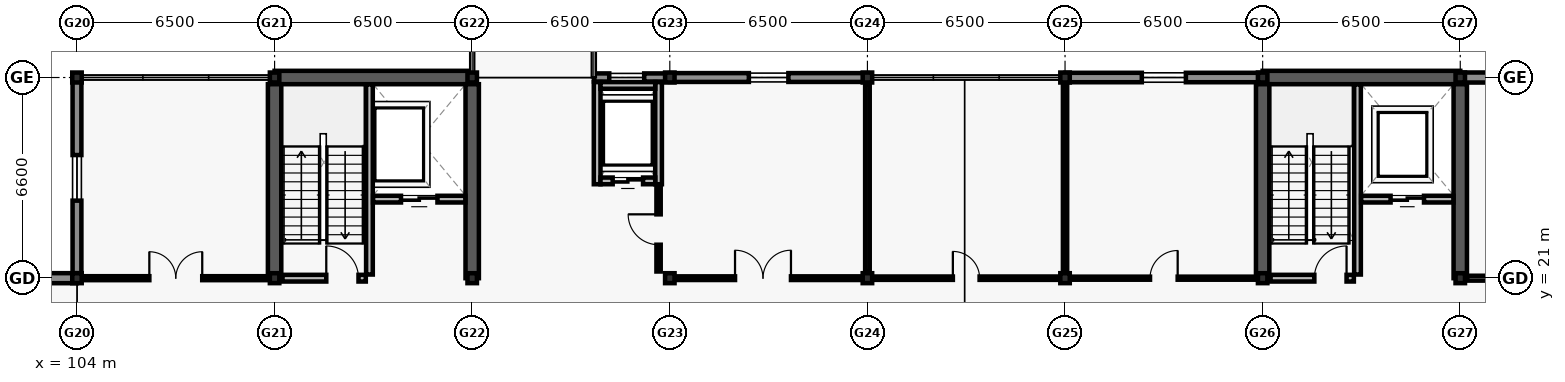
"""IFC4 building model, lengths in metres.
Left out: names, types, materials, properties, quantities, classifications, styles, units other than length and angle.
Written with IfcOpenShell. Run it as: python <this file> out.ifc"""

import sys

from ifc_helpers import new_model, si_unit, direction, frame, frame_2d, origin, origin_2d, place, context, subcontext, project, spatial, rectangle, i_section, extrude, element, fill, save


model = new_model("IFC4")
c1 = context("Model", 3, precision=1e-05, world=origin(), true_north=direction((0.0, 1.0)))
c2 = subcontext(c1, "Body", "Model", "MODEL_VIEW")
j1 = project(units=[si_unit("LENGTHUNIT", "METRE"), si_unit("PLANEANGLEUNIT", "RADIAN")], contexts=[c1])
p1 = place(None, origin())
s1 = spatial("IfcSite", under=j1, at=p1, CompositionType="ELEMENT")
p2 = place(p1, origin())
s2 = spatial("IfcBuilding", under=s1, at=p2, CompositionType="ELEMENT")
p3 = place(p2, frame((0.0, 0.0, 5.4)))
s3 = spatial("IfcBuildingStorey", under=s2, at=p3, CompositionType="ELEMENT", Elevation=5.4)
for number, where, z_axis, x_axis in (
    (1, (104.0, 21.0, 0.0), (0.0, 0.0, 1.0), (1.0, 0.0, 0.0)),
    (2, (104.0, 27.6, 0.0), (0.0, 0.0, 1.0), (1.0, 0.0, 0.0)),
    (3, (110.5, 21.0, 0.0), (0.0, 0.0, 1.0), (1.0, 0.0, 0.0)),
    (4, (110.5, 27.6, 0.0), (0.0, 0.0, 1.0), (1.0, 0.0, 0.0)),
    (5, (117.0, 21.0, 0.0), (0.0, 0.0, 1.0), (1.0, 0.0, 0.0)),
    (6, (117.0, 27.6, 0.0), (0.0, 0.0, 1.0), (1.0, 0.0, 0.0)),
    (7, (123.5, 21.0, 0.0), (0.0, 0.0, 1.0), (1.0, 0.0, 0.0)),
    (8, (123.5, 27.6, 0.0), (0.0, 0.0, 1.0), (1.0, 0.0, 0.0)),
    (9, (130.0, 21.0, 0.0), (0.0, 0.0, 1.0), (1.0, 0.0, 0.0)),
    (10, (130.0, 27.6, 0.0), (0.0, 0.0, 1.0), (1.0, 0.0, 0.0)),
    (11, (136.5, 21.0, 0.0), (0.0, 0.0, 1.0), (1.0, 0.0, 0.0)),
    (12, (136.5, 27.6, 0.0), (0.0, 0.0, 1.0), (1.0, 0.0, 0.0)),
    (13, (143.0, 21.0, 0.0), (0.0, 0.0, 1.0), (1.0, 0.0, 0.0)),
    (14, (143.0, 27.6, 0.0), (0.0, 0.0, 1.0), (1.0, 0.0, 0.0)),
    (15, (149.5, 21.0, 0.0), (0.0, 0.0, 1.0), (1.0, 0.0, 0.0)),
    (16, (149.5, 27.6, 0.0), (0.0, 0.0, 1.0), (1.0, 0.0, 0.0)),
):
    element("IfcColumn", number, at=place(p3, frame(where, z_axis=z_axis, x_axis=x_axis)), inside=s3, PredefinedType="COLUMN", context=c2, shape_type="SweptSolid", body=[
        extrude(i_section(OverallWidth=0.311, OverallDepth=0.327, WebThickness=0.016, FlangeThickness=0.025, FilletRadius=0.017, at=origin_2d()), origin(), (0.0, 0.0, 1.0), 4.2),
    ])
p4 = place(p3, frame((110.5, 27.6, 0.0), z_axis=(0.0, 0.0, 1.0), x_axis=(1.0, 0.0, 0.0)))
e17 = element("IfcWall", 17, at=p4, inside=s3, PredefinedType="SHEAR", context=c2, shape_type="SweptSolid", body=[
    extrude(rectangle(XDim=6.5, YDim=0.44, at=frame_2d((3.25, 0.0))), origin(), (0.0, 0.0, 1.0), 3.96),
])
for number, where, z_axis, x_axis in (
    (18, (110.5, 21.0, 0.0), (0.0, 0.0, 1.0), (0.0, 1.0, 0.0)),
    (19, (117.0, 21.0, 0.0), (0.0, 0.0, 1.0), (0.0, 1.0, 0.0)),
):
    element("IfcWall", number, at=place(p3, frame(where, z_axis=z_axis, x_axis=x_axis)), inside=s3, PredefinedType="SHEAR", context=c2, shape_type="SweptSolid", body=[
        extrude(rectangle(XDim=6.38, YDim=0.44, at=frame_2d((3.19, 0.0))), origin(), (0.0, 0.0, 1.0), 3.96),
    ])
p5 = place(p3, frame((143.0, 27.6, 0.0), z_axis=(0.0, 0.0, 1.0), x_axis=(1.0, 0.0, 0.0)))
e20 = element("IfcWall", 20, at=p5, inside=s3, PredefinedType="SHEAR", context=c2, shape_type="SweptSolid", body=[
    extrude(rectangle(XDim=6.5, YDim=0.44, at=frame_2d((3.25, 0.0))), origin(), (0.0, 0.0, 1.0), 3.96),
])
for number, where, z_axis, x_axis in (
    (21, (143.0, 21.0, 0.0), (0.0, 0.0, 1.0), (0.0, 1.0, 0.0)),
    (22, (149.5, 21.0, 0.0), (0.0, 0.0, 1.0), (0.0, 1.0, 0.0)),
):
    element("IfcWall", number, at=place(p3, frame(where, z_axis=z_axis, x_axis=x_axis)), inside=s3, PredefinedType="SHEAR", context=c2, shape_type="SweptSolid", body=[
        extrude(rectangle(XDim=6.38, YDim=0.44, at=frame_2d((3.19, 0.0))), origin(), (0.0, 0.0, 1.0), 3.96),
    ])
p6 = place(p3, frame((121.005, 27.6, 0.0), z_axis=(0.0, 0.0, 1.0), x_axis=(1.0, 0.0, 0.0)))
e23 = element("IfcWall", 23, at=p6, inside=s3, PredefinedType="SOLIDWALL", context=c2, shape_type="SweptSolid", body=[
    extrude(rectangle(XDim=2.49, YDim=0.27, at=frame_2d((1.245, 0.0))), origin(), (0.0, 0.0, 1.0), 3.32),
])
p7 = place(p6, frame((0.502, 0.0, 0.8)))
e24 = element("IfcOpeningElement", 24, at=p7, cuts=e23, PredefinedType="OPENING", context=c2, shape_type="SweptSolid", body=[
    extrude(rectangle(XDim=1.15, YDim=1.8, at=frame_2d((0.575, 0.9))), frame((0.0, 0.145, 0.0), z_axis=(0.0, -1.0, 0.0), x_axis=(1.0, 0.0, 0.0)), (0.0, 0.0, 1.0), 0.29),
])
p8 = place(p3, frame((123.505, 27.6, 0.0), z_axis=(0.0, 0.0, 1.0), x_axis=(1.0, 0.0, 0.0)))
e25 = element("IfcWall", 25, at=p8, inside=s3, PredefinedType="SOLIDWALL", context=c2, shape_type="SweptSolid", body=[
    extrude(rectangle(XDim=6.49, YDim=0.29, at=frame_2d((3.245, 0.0))), origin(), (0.0, 0.0, 1.0), 3.32),
])
p9 = place(p8, frame((2.595, 0.0, 0.8)))
e26 = element("IfcOpeningElement", 26, at=p9, cuts=e25, PredefinedType="OPENING", context=c2, shape_type="SweptSolid", body=[
    extrude(rectangle(XDim=1.3, YDim=1.8, at=frame_2d((0.65, 0.9))), frame((0.0, 0.155, 0.0), z_axis=(0.0, -1.0, 0.0), x_axis=(1.0, 0.0, 0.0)), (0.0, 0.0, 1.0), 0.31),
])
p10 = place(p3, frame((136.505, 27.6, 0.0), z_axis=(0.0, 0.0, 1.0), x_axis=(1.0, 0.0, 0.0)))
e27 = element("IfcWall", 27, at=p10, inside=s3, PredefinedType="SOLIDWALL", context=c2, shape_type="SweptSolid", body=[
    extrude(rectangle(XDim=6.49, YDim=0.31, at=frame_2d((3.245, 0.0))), origin(), (0.0, 0.0, 1.0), 3.32),
])
p11 = place(p10, frame((2.52, 0.0, 0.8)))
e28 = element("IfcOpeningElement", 28, at=p11, cuts=e27, PredefinedType="OPENING", context=c2, shape_type="SweptSolid", body=[
    extrude(rectangle(XDim=1.45, YDim=1.8, at=frame_2d((0.725, 0.9))), frame((0.0, 0.165, 0.0), z_axis=(0.0, -1.0, 0.0), x_axis=(1.0, 0.0, 0.0)), (0.0, 0.0, 1.0), 0.33),
])
p12 = place(p3, frame((149.505, 27.6, 0.0), z_axis=(0.0, 0.0, 1.0), x_axis=(1.0, 0.0, 0.0)))
e29 = element("IfcWall", 29, at=p12, inside=s3, PredefinedType="SOLIDWALL", context=c2, shape_type="SweptSolid", body=[
    extrude(rectangle(XDim=6.49, YDim=0.33, at=frame_2d((3.245, 0.0))), origin(), (0.0, 0.0, 1.0), 3.32),
])
p13 = place(p12, frame((2.445, 0.0, 0.8)))
e30 = element("IfcOpeningElement", 30, at=p13, cuts=e29, PredefinedType="OPENING", context=c2, shape_type="SweptSolid", body=[
    extrude(rectangle(XDim=1.6, YDim=1.8, at=frame_2d((0.8, 0.9))), frame((0.0, 0.175, 0.0), z_axis=(0.0, -1.0, 0.0), x_axis=(1.0, 0.0, 0.0)), (0.0, 0.0, 1.0), 0.35),
])
p14 = place(p3, frame((104.0, 21.005, 0.0), z_axis=(0.0, 0.0, 1.0), x_axis=(0.0, 1.0, 0.0)))
e31 = element("IfcWall", 31, at=p14, inside=s3, PredefinedType="SOLIDWALL", context=c2, shape_type="SweptSolid", body=[
    extrude(rectangle(XDim=6.59, YDim=0.29, at=frame_2d((3.295, 0.0))), origin(), (0.0, 0.0, 1.0), 3.32),
])
p15 = place(p14, frame((2.545, 0.0, 0.8)))
e32 = element("IfcOpeningElement", 32, at=p15, cuts=e31, PredefinedType="OPENING", context=c2, shape_type="SweptSolid", body=[
    extrude(rectangle(XDim=1.5, YDim=2.05, at=frame_2d((0.75, 1.025))), frame((0.0, 0.155, 0.0), z_axis=(0.0, -1.0, 0.0), x_axis=(1.0, 0.0, 0.0)), (0.0, 0.0, 1.0), 0.31),
])
p16 = place(p3, frame((102.805, 21.0, 0.0), z_axis=(0.0, 0.0, 1.0), x_axis=(1.0, 0.0, 0.0)))
e33 = element("IfcWall", 33, at=p16, inside=s3, PredefinedType="SOLIDWALL", context=c2, shape_type="SweptSolid", body=[
    extrude(rectangle(XDim=1.19, YDim=0.33, at=frame_2d((0.595, 0.0))), origin(), (0.0, 0.0, 1.0), 3.32),
])
p17 = place(p3, frame((113.62, 21.12, 0.0), z_axis=(0.0, 0.0, 1.0), x_axis=(0.0, 1.0, 0.0)))
e34 = element("IfcWall", 34, at=p17, inside=s3, PredefinedType="SOLIDWALL", context=c2, shape_type="SweptSolid", body=[
    extrude(rectangle(XDim=6.255, YDim=0.22, at=frame_2d((3.127, 0.0))), origin(), (0.0, 0.0, 1.0), 3.96),
])
p18 = place(p3, frame((110.76, 21.0, 0.0), z_axis=(0.0, 0.0, 1.0), x_axis=(1.0, 0.0, 0.0)))
e35 = element("IfcWall", 35, at=p18, inside=s3, PredefinedType="SOLIDWALL", context=c2, shape_type="SweptSolid", body=[
    extrude(rectangle(XDim=2.74, YDim=0.22, at=frame_2d((1.37, 0.0))), origin(), (0.0, 0.0, 1.0), 3.32),
])
p19 = place(p18, frame((1.44, 0.0, 0.0)))
e36 = element("IfcOpeningElement", 36, at=p19, cuts=e35, PredefinedType="OPENING", context=c2, shape_type="SweptSolid", body=[
    extrude(rectangle(XDim=1.06, YDim=2.1, at=frame_2d((0.53, 1.05))), frame((0.0, 0.12, 0.0), z_axis=(0.0, -1.0, 0.0), x_axis=(1.0, 0.0, 0.0)), (0.0, 0.0, 1.0), 0.24),
])
p20 = place(p3, frame((113.74, 23.6, 0.0), z_axis=(0.0, 0.0, 1.0), x_axis=(1.0, 0.0, 0.0)))
e37 = element("IfcWall", 37, at=p20, inside=s3, PredefinedType="SOLIDWALL", context=c2, shape_type="SweptSolid", body=[
    extrude(rectangle(XDim=3.035, YDim=0.22, at=frame_2d((1.518, 0.0))), origin(), (0.0, 0.0, 1.0), 3.96),
])
p21 = place(p20, frame((0.917, 0.0, 0.0)))
e38 = element("IfcOpeningElement", 38, at=p21, cuts=e37, PredefinedType="OPENING", context=c2, shape_type="SweptSolid", body=[
    extrude(rectangle(XDim=1.2, YDim=2.15, at=frame_2d((0.6, 1.075))), frame((0.0, 0.12, 0.0), z_axis=(0.0, -1.0, 0.0), x_axis=(1.0, 0.0, 0.0)), (0.0, 0.0, 1.0), 0.24),
])
for number, where, z_axis, x_axis in (
    (39, (121.11, 24.09, 0.0), (0.0, 0.0, 1.0), (0.0, 1.0, 0.0)),
    (40, (123.13, 24.09, 0.0), (0.0, 0.0, 1.0), (0.0, 1.0, 0.0)),
):
    element("IfcWall", number, at=place(p3, frame(where, z_axis=z_axis, x_axis=x_axis)), inside=s3, PredefinedType="SOLIDWALL", context=c2, shape_type="SweptSolid", body=[
        extrude(rectangle(XDim=3.36, YDim=0.22, at=frame_2d((1.68, 0.0))), origin(), (0.0, 0.0, 1.0), 3.96),
    ])
p22 = place(p3, frame((121.22, 27.34, 0.0), z_axis=(0.0, 0.0, 1.0), x_axis=(1.0, 0.0, 0.0)))
e41 = element("IfcWall", 41, at=p22, inside=s3, PredefinedType="SOLIDWALL", context=c2, shape_type="SweptSolid", body=[
    extrude(rectangle(XDim=1.8, YDim=0.22, at=frame_2d((0.9, 0.0))), origin(), (0.0, 0.0, 1.0), 3.96),
])
p23 = place(p3, frame((121.22, 24.2, 0.0), z_axis=(0.0, 0.0, 1.0), x_axis=(1.0, 0.0, 0.0)))
e42 = element("IfcWall", 42, at=p23, inside=s3, PredefinedType="SOLIDWALL", context=c2, shape_type="SweptSolid", body=[
    extrude(rectangle(XDim=1.8, YDim=0.22, at=frame_2d((0.9, 0.0))), origin(), (0.0, 0.0, 1.0), 3.96),
])
p24 = place(p23, frame((0.4, 0.0, 0.0)))
e43 = element("IfcOpeningElement", 43, at=p24, cuts=e42, PredefinedType="OPENING", context=c2, shape_type="SweptSolid", body=[
    extrude(rectangle(XDim=1.0, YDim=2.1, at=frame_2d((0.5, 1.05))), frame((0.0, 0.12, 0.0), z_axis=(0.0, -1.0, 0.0), x_axis=(1.0, 0.0, 0.0)), (0.0, 0.0, 1.0), 0.24),
])
p25 = place(p3, frame((146.12, 21.12, 0.0), z_axis=(0.0, 0.0, 1.0), x_axis=(0.0, 1.0, 0.0)))
e44 = element("IfcWall", 44, at=p25, inside=s3, PredefinedType="SOLIDWALL", context=c2, shape_type="SweptSolid", body=[
    extrude(rectangle(XDim=6.255, YDim=0.22, at=frame_2d((3.127, 0.0))), origin(), (0.0, 0.0, 1.0), 3.96),
])
p26 = place(p3, frame((143.26, 21.0, 0.0), z_axis=(0.0, 0.0, 1.0), x_axis=(1.0, 0.0, 0.0)))
e45 = element("IfcWall", 45, at=p26, inside=s3, PredefinedType="SOLIDWALL", context=c2, shape_type="SweptSolid", body=[
    extrude(rectangle(XDim=2.74, YDim=0.22, at=frame_2d((1.37, 0.0))), origin(), (0.0, 0.0, 1.0), 3.32),
])
p27 = place(p26, frame((1.44, 0.0, 0.0)))
e46 = element("IfcOpeningElement", 46, at=p27, cuts=e45, PredefinedType="OPENING", context=c2, shape_type="SweptSolid", body=[
    extrude(rectangle(XDim=1.06, YDim=2.1, at=frame_2d((0.53, 1.05))), frame((0.0, 0.12, 0.0), z_axis=(0.0, -1.0, 0.0), x_axis=(1.0, 0.0, 0.0)), (0.0, 0.0, 1.0), 0.24),
])
p28 = place(p3, frame((146.24, 23.6, 0.0), z_axis=(0.0, 0.0, 1.0), x_axis=(1.0, 0.0, 0.0)))
e47 = element("IfcWall", 47, at=p28, inside=s3, PredefinedType="SOLIDWALL", context=c2, shape_type="SweptSolid", body=[
    extrude(rectangle(XDim=3.035, YDim=0.22, at=frame_2d((1.518, 0.0))), origin(), (0.0, 0.0, 1.0), 3.96),
])
p29 = place(p28, frame((0.968, 0.0, 0.0)))
e48 = element("IfcOpeningElement", 48, at=p29, cuts=e47, PredefinedType="OPENING", context=c2, shape_type="SweptSolid", body=[
    extrude(rectangle(XDim=1.1, YDim=2.1, at=frame_2d((0.55, 1.05))), frame((0.0, 0.12, 0.0), z_axis=(0.0, -1.0, 0.0), x_axis=(1.0, 0.0, 0.0)), (0.0, 0.0, 1.0), 0.24),
])
p30 = place(p3, frame((123.13, 21.22, 0.0), z_axis=(0.0, 0.0, 1.0), x_axis=(0.0, 1.0, 0.0)))
e49 = element("IfcWall", 49, at=p30, inside=s3, PredefinedType="PARTITIONING", context=c2, shape_type="SweptSolid", body=[
    extrude(rectangle(XDim=2.76, YDim=0.14, at=frame_2d((1.38, 0.0))), origin(), (0.0, 0.0, 1.0), 3.3),
])
p31 = place(p30, frame((0.88, 0.0, 0.0)))
e50 = element("IfcOpeningElement", 50, at=p31, cuts=e49, PredefinedType="OPENING", context=c2, shape_type="SweptSolid", body=[
    extrude(rectangle(XDim=1.0, YDim=2.12, at=frame_2d((0.5, 1.06))), frame((0.0, 0.08, 0.0), z_axis=(0.0, -1.0, 0.0), x_axis=(1.0, 0.0, 0.0)), (0.0, 0.0, 1.0), 0.16),
])
p32 = place(p3, frame((104.22, 21.0, 0.0), z_axis=(0.0, 0.0, 1.0), x_axis=(1.0, 0.0, 0.0)))
e51 = element("IfcWall", 51, at=p32, inside=s3, PredefinedType="PARTITIONING", context=c2, shape_type="SweptSolid", body=[
    extrude(rectangle(XDim=6.06, YDim=0.13, at=frame_2d((3.03, 0.0))), origin(), (0.0, 0.0, 1.0), 3.3),
])
p33 = place(p32, frame((2.16, 0.0, 0.0)))
e52 = element("IfcOpeningElement", 52, at=p33, cuts=e51, PredefinedType="OPENING", context=c2, shape_type="SweptSolid", body=[
    extrude(rectangle(XDim=1.74, YDim=2.2, at=frame_2d((0.87, 1.1))), frame((0.0, 0.075, 0.0), z_axis=(0.0, -1.0, 0.0), x_axis=(1.0, 0.0, 0.0)), (0.0, 0.0, 1.0), 0.15),
])
p34 = place(p3, frame((123.35, 21.0, 0.0), z_axis=(0.0, 0.0, 1.0), x_axis=(1.0, 0.0, 0.0)))
e53 = element("IfcWall", 53, at=p34, inside=s3, PredefinedType="PARTITIONING", context=c2, shape_type="SweptSolid", body=[
    extrude(rectangle(XDim=6.43, YDim=0.12, at=frame_2d((3.215, 0.0))), origin(), (0.0, 0.0, 1.0), 3.3),
])
p35 = place(p34, frame((2.295, 0.0, 0.0)))
e54 = element("IfcOpeningElement", 54, at=p35, cuts=e53, PredefinedType="OPENING", context=c2, shape_type="SweptSolid", body=[
    extrude(rectangle(XDim=1.84, YDim=2.22, at=frame_2d((0.92, 1.11))), frame((0.0, 0.07, 0.0), z_axis=(0.0, -1.0, 0.0), x_axis=(1.0, 0.0, 0.0)), (0.0, 0.0, 1.0), 0.14),
])
p36 = place(p3, frame((130.22, 21.0, 0.0), z_axis=(0.0, 0.0, 1.0), x_axis=(1.0, 0.0, 0.0)))
e55 = element("IfcWall", 55, at=p36, inside=s3, PredefinedType="PARTITIONING", context=c2, shape_type="SweptSolid", body=[
    extrude(rectangle(XDim=6.06, YDim=0.11, at=frame_2d((3.03, 0.0))), origin(), (0.0, 0.0, 1.0), 3.3),
])
p37 = place(p36, frame((2.59, 0.0, 0.0)))
e56 = element("IfcOpeningElement", 56, at=p37, cuts=e55, PredefinedType="OPENING", context=c2, shape_type="SweptSolid", body=[
    extrude(rectangle(XDim=0.88, YDim=2.04, at=frame_2d((0.44, 1.02))), frame((0.0, 0.065, 0.0), z_axis=(0.0, -1.0, 0.0), x_axis=(1.0, 0.0, 0.0)), (0.0, 0.0, 1.0), 0.13),
])
p38 = place(p3, frame((136.72, 21.0, 0.0), z_axis=(0.0, 0.0, 1.0), x_axis=(1.0, 0.0, 0.0)))
e57 = element("IfcWall", 57, at=p38, inside=s3, PredefinedType="PARTITIONING", context=c2, shape_type="SweptSolid", body=[
    extrude(rectangle(XDim=6.06, YDim=0.1, at=frame_2d((3.03, 0.0))), origin(), (0.0, 0.0, 1.0), 3.3),
])
p39 = place(p38, frame((2.575, 0.0, 0.0)))
e58 = element("IfcOpeningElement", 58, at=p39, cuts=e57, PredefinedType="OPENING", context=c2, shape_type="SweptSolid", body=[
    extrude(rectangle(XDim=0.91, YDim=2.06, at=frame_2d((0.455, 1.03))), frame((0.0, 0.06, 0.0), z_axis=(0.0, -1.0, 0.0), x_axis=(1.0, 0.0, 0.0)), (0.0, 0.0, 1.0), 0.12),
])
p40 = place(p3, frame((149.72, 21.0, 0.0), z_axis=(0.0, 0.0, 1.0), x_axis=(1.0, 0.0, 0.0)))
e59 = element("IfcWall", 59, at=p40, inside=s3, PredefinedType="PARTITIONING", context=c2, shape_type="SweptSolid", body=[
    extrude(rectangle(XDim=12.46, YDim=0.16, at=frame_2d((6.23, 0.0))), origin(), (0.0, 0.0, 1.0), 3.3),
])
p41 = place(p40, frame((5.01, 0.0, 0.0)))
e60 = element("IfcOpeningElement", 60, at=p41, cuts=e59, PredefinedType="OPENING", context=c2, shape_type="SweptSolid", body=[
    extrude(rectangle(XDim=0.94, YDim=2.08, at=frame_2d((0.47, 1.04))), frame((0.0, 0.09, 0.0), z_axis=(0.0, -1.0, 0.0), x_axis=(1.0, 0.0, 0.0)), (0.0, 0.0, 1.0), 0.18),
])
p42 = place(p3, frame((130.0, 21.22, 0.0), z_axis=(0.0, 0.0, 1.0), x_axis=(0.0, 1.0, 0.0)))
e61 = element("IfcWall", 61, at=p42, inside=s3, PredefinedType="PARTITIONING", context=c2, shape_type="SweptSolid", body=[
    extrude(rectangle(XDim=6.16, YDim=0.15, at=frame_2d((3.08, 0.0))), origin(), (0.0, 0.0, 1.0), 3.3),
])
p43 = place(p3, frame((136.5, 21.22, 0.0), z_axis=(0.0, 0.0, 1.0), x_axis=(0.0, 1.0, 0.0)))
e62 = element("IfcWall", 62, at=p43, inside=s3, PredefinedType="PARTITIONING", context=c2, shape_type="SweptSolid", body=[
    extrude(rectangle(XDim=6.16, YDim=0.14, at=frame_2d((3.08, 0.0))), origin(), (0.0, 0.0, 1.0), 3.3),
])
p44 = place(p7, origin())
e63 = element("IfcWindow", 63, at=p44, inside=s3, PartitioningType="SINGLE_PANEL", PredefinedType="WINDOW", context=c2, shape_type="SweptSolid", body=[
    extrude(rectangle(XDim=1.15, YDim=1.8, at=frame_2d((0.575, 0.9))), frame((0.0, 0.03, 0.0), z_axis=(0.0, -1.0, 0.0), x_axis=(1.0, 0.0, 0.0)), (0.0, 0.0, 1.0), 0.06),
])
fill(e24, e63)
p45 = place(p9, origin())
e64 = element("IfcWindow", 64, at=p45, inside=s3, PartitioningType="SINGLE_PANEL", PredefinedType="WINDOW", context=c2, shape_type="SweptSolid", body=[
    extrude(rectangle(XDim=1.3, YDim=1.8, at=frame_2d((0.65, 0.9))), frame((0.0, 0.03, 0.0), z_axis=(0.0, -1.0, 0.0), x_axis=(1.0, 0.0, 0.0)), (0.0, 0.0, 1.0), 0.06),
])
fill(e26, e64)
p46 = place(p11, origin())
e65 = element("IfcWindow", 65, at=p46, inside=s3, PartitioningType="SINGLE_PANEL", PredefinedType="WINDOW", context=c2, shape_type="SweptSolid", body=[
    extrude(rectangle(XDim=1.45, YDim=1.8, at=frame_2d((0.725, 0.9))), frame((0.0, 0.03, 0.0), z_axis=(0.0, -1.0, 0.0), x_axis=(1.0, 0.0, 0.0)), (0.0, 0.0, 1.0), 0.06),
])
fill(e28, e65)
p47 = place(p15, origin())
e66 = element("IfcWindow", 66, at=p47, inside=s3, PartitioningType="SINGLE_PANEL", PredefinedType="WINDOW", context=c2, shape_type="SweptSolid", body=[
    extrude(rectangle(XDim=1.5, YDim=2.05, at=frame_2d((0.75, 1.025))), frame((0.0, 0.03, 0.0), z_axis=(0.0, -1.0, 0.0), x_axis=(1.0, 0.0, 0.0)), (0.0, 0.0, 1.0), 0.06),
])
fill(e32, e66)
p48 = place(p19, origin())
e67 = element("IfcDoor", 67, at=p48, inside=s3, OperationType="SINGLE_SWING_LEFT", PredefinedType="DOOR", context=c2, shape_type="SweptSolid", body=[
    extrude(rectangle(XDim=1.06, YDim=2.1, at=frame_2d((0.53, 1.05))), frame((0.0, 0.025, 0.0), z_axis=(0.0, -1.0, 0.0), x_axis=(1.0, 0.0, 0.0)), (0.0, 0.0, 1.0), 0.05),
])
fill(e36, e67)
p49 = place(p21, origin())
e68 = element("IfcDoor", 68, at=p49, inside=s3, OperationType="DOUBLE_DOOR_SLIDING", PredefinedType="DOOR", context=c2, shape_type="SweptSolid", body=[
    extrude(rectangle(XDim=1.2, YDim=2.15, at=frame_2d((0.6, 1.075))), frame((0.0, 0.025, 0.0), z_axis=(0.0, -1.0, 0.0), x_axis=(1.0, 0.0, 0.0)), (0.0, 0.0, 1.0), 0.05),
])
fill(e38, e68)
p50 = place(p24, origin())
e69 = element("IfcDoor", 69, at=p50, inside=s3, OperationType="DOUBLE_DOOR_SLIDING", PredefinedType="DOOR", context=c2, shape_type="SweptSolid", body=[
    extrude(rectangle(XDim=1.0, YDim=2.1, at=frame_2d((0.5, 1.05))), frame((0.0, 0.025, 0.0), z_axis=(0.0, -1.0, 0.0), x_axis=(1.0, 0.0, 0.0)), (0.0, 0.0, 1.0), 0.05),
])
fill(e43, e69)
p51 = place(p27, origin())
e70 = element("IfcDoor", 70, at=p51, inside=s3, OperationType="SINGLE_SWING_RIGHT", PredefinedType="DOOR", context=c2, shape_type="SweptSolid", body=[
    extrude(rectangle(XDim=1.06, YDim=2.1, at=frame_2d((0.53, 1.05))), frame((0.0, 0.025, 0.0), z_axis=(0.0, -1.0, 0.0), x_axis=(1.0, 0.0, 0.0)), (0.0, 0.0, 1.0), 0.05),
])
fill(e46, e70)
p52 = place(p29, origin())
e71 = element("IfcDoor", 71, at=p52, inside=s3, OperationType="DOUBLE_DOOR_SLIDING", PredefinedType="DOOR", context=c2, shape_type="SweptSolid", body=[
    extrude(rectangle(XDim=1.1, YDim=2.1, at=frame_2d((0.55, 1.05))), frame((0.0, 0.025, 0.0), z_axis=(0.0, -1.0, 0.0), x_axis=(1.0, 0.0, 0.0)), (0.0, 0.0, 1.0), 0.05),
])
fill(e48, e71)
p53 = place(p31, origin())
e72 = element("IfcDoor", 72, at=p53, inside=s3, OperationType="SINGLE_SWING_RIGHT", PredefinedType="DOOR", context=c2, shape_type="SweptSolid", body=[
    extrude(rectangle(XDim=1.0, YDim=2.12, at=frame_2d((0.5, 1.06))), frame((0.0, 0.025, 0.0), z_axis=(0.0, -1.0, 0.0), x_axis=(1.0, 0.0, 0.0)), (0.0, 0.0, 1.0), 0.05),
])
fill(e50, e72)
p54 = place(p33, origin())
e73 = element("IfcDoor", 73, at=p54, inside=s3, OperationType="DOUBLE_DOOR_SINGLE_SWING", PredefinedType="DOOR", context=c2, shape_type="SweptSolid", body=[
    extrude(rectangle(XDim=1.74, YDim=2.2, at=frame_2d((0.87, 1.1))), frame((0.0, 0.025, 0.0), z_axis=(0.0, -1.0, 0.0), x_axis=(1.0, 0.0, 0.0)), (0.0, 0.0, 1.0), 0.05),
])
fill(e52, e73)
p55 = place(p35, origin())
e74 = element("IfcDoor", 74, at=p55, inside=s3, OperationType="DOUBLE_DOOR_SINGLE_SWING", PredefinedType="DOOR", context=c2, shape_type="SweptSolid", body=[
    extrude(rectangle(XDim=1.84, YDim=2.22, at=frame_2d((0.92, 1.11))), frame((0.0, 0.025, 0.0), z_axis=(0.0, -1.0, 0.0), x_axis=(1.0, 0.0, 0.0)), (0.0, 0.0, 1.0), 0.05),
])
fill(e54, e74)
p56 = place(p37, origin())
e75 = element("IfcDoor", 75, at=p56, inside=s3, OperationType="SINGLE_SWING_LEFT", PredefinedType="DOOR", context=c2, shape_type="SweptSolid", body=[
    extrude(rectangle(XDim=0.88, YDim=2.04, at=frame_2d((0.44, 1.02))), frame((0.0, 0.025, 0.0), z_axis=(0.0, -1.0, 0.0), x_axis=(1.0, 0.0, 0.0)), (0.0, 0.0, 1.0), 0.05),
])
fill(e56, e75)
p57 = place(p39, origin())
e76 = element("IfcDoor", 76, at=p57, inside=s3, OperationType="SINGLE_SWING_RIGHT", PredefinedType="DOOR", context=c2, shape_type="SweptSolid", body=[
    extrude(rectangle(XDim=0.91, YDim=2.06, at=frame_2d((0.455, 1.03))), frame((0.0, 0.025, 0.0), z_axis=(0.0, -1.0, 0.0), x_axis=(1.0, 0.0, 0.0)), (0.0, 0.0, 1.0), 0.05),
])
fill(e58, e76)
save(model, sys.argv[1])
